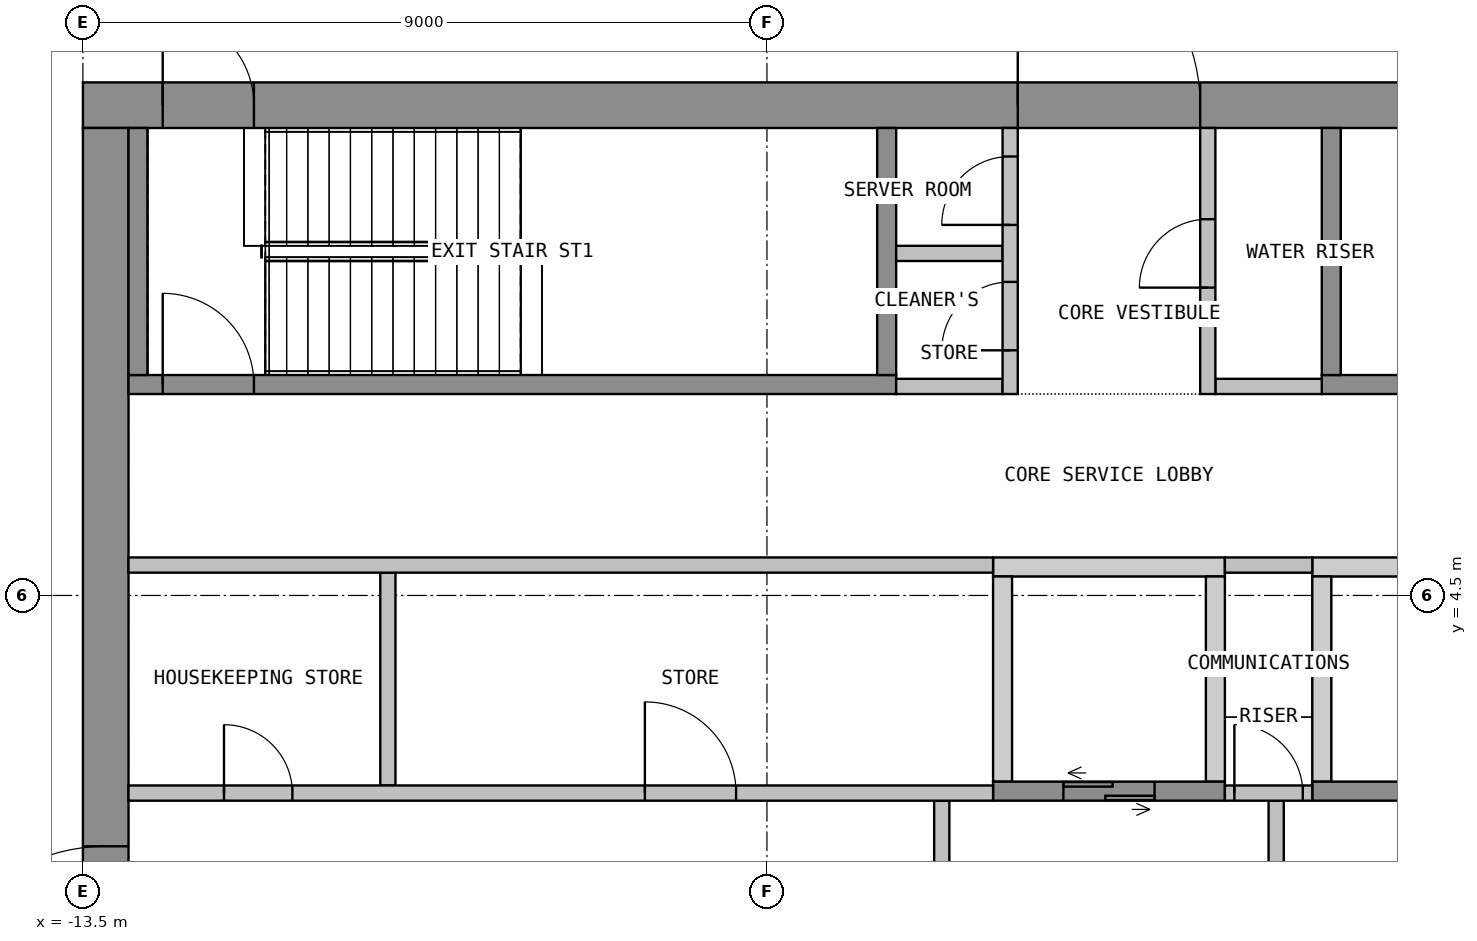
"""IFC4 building model, lengths in metres.
Left out: names, types, materials, properties, quantities, classifications, styles, units other than length and angle.
Written with IfcOpenShell. Run it as: python <this file> out.ifc"""

import sys

from ifc_helpers import new_model, si_unit, direction, frame, frame_2d, origin, place, context, subcontext, project, spatial, polyline, rectangle, outline, extrude, element, fill, save


model = new_model("IFC4")
c1 = context("Model", 3, precision=1e-05, world=origin(), true_north=direction((0.0, 1.0)))
c2 = subcontext(c1, "Body", "Model", "MODEL_VIEW")
j1 = project(units=[si_unit("LENGTHUNIT", "METRE"), si_unit("PLANEANGLEUNIT", "RADIAN")], contexts=[c1])
p1 = place(None, origin())
s1 = spatial("IfcSite", under=j1, at=p1, CompositionType="ELEMENT")
p2 = place(p1, origin())
s2 = spatial("IfcBuilding", under=s1, at=p2, CompositionType="ELEMENT")
p3 = place(p2, frame((0.0, 0.0, 309.9)))
s3 = spatial("IfcBuildingStorey", under=s2, at=p3, CompositionType="ELEMENT", Elevation=309.9)
p4 = place(p3, frame((-13.5, 10.95, 0.0), z_axis=(0.0, 0.0, 1.0), x_axis=(1.0, 0.0, 0.0)))
e1 = element("IfcWall", 1, at=p4, inside=s3, PredefinedType="SHEAR", context=c2, shape_type="SweptSolid", body=[
    extrude(rectangle(XDim=27.0, YDim=0.6, at=frame_2d((13.5, 0.0))), origin(), (0.0, 0.0, 1.0), 8.55),
])
p5 = place(p4, frame((12.3, 0.0, 0.0)))
e2 = element("IfcOpeningElement", 2, at=p5, cuts=e1, PredefinedType="OPENING", context=c2, shape_type="SweptSolid", body=[
    extrude(rectangle(XDim=2.4, YDim=2.1, at=frame_2d((1.2, 1.05))), frame((0.0, 0.31, 0.0), z_axis=(0.0, -1.0, 0.0), x_axis=(1.0, 0.0, 0.0)), (0.0, 0.0, 1.0), 0.62),
])
p6 = place(p4, frame((1.05, 0.0, 0.0)))
e3 = element("IfcOpeningElement", 3, at=p6, cuts=e1, PredefinedType="OPENING", context=c2, shape_type="SweptSolid", body=[
    extrude(rectangle(XDim=1.2, YDim=2.1, at=frame_2d((0.6, 1.05))), frame((0.0, 0.31, 0.0), z_axis=(0.0, -1.0, 0.0), x_axis=(1.0, 0.0, 0.0)), (0.0, 0.0, 1.0), 0.62),
])
p7 = place(p4, frame((24.75, 0.0, 0.0)))
e4 = element("IfcOpeningElement", 4, at=p7, cuts=e1, PredefinedType="OPENING", context=c2, shape_type="SweptSolid", body=[
    extrude(rectangle(XDim=1.2, YDim=2.1, at=frame_2d((0.6, 1.05))), frame((0.0, 0.31, 0.0), z_axis=(0.0, -1.0, 0.0), x_axis=(1.0, 0.0, 0.0)), (0.0, 0.0, 1.0), 0.62),
])
p8 = place(p3, frame((-13.2, -10.65, 0.0), z_axis=(0.0, 0.0, 1.0), x_axis=(0.0, 1.0, 0.0)))
e5 = element("IfcWall", 5, at=p8, inside=s3, PredefinedType="SHEAR", context=c2, shape_type="SweptSolid", body=[
    extrude(rectangle(XDim=21.3, YDim=0.6, at=frame_2d((10.65, 0.0))), origin(), (0.0, 0.0, 1.0), 8.55),
])
p9 = place(p8, frame((9.45, 0.0, 0.0)))
e6 = element("IfcOpeningElement", 6, at=p9, cuts=e5, PredefinedType="OPENING", context=c2, shape_type="SweptSolid", body=[
    extrude(rectangle(XDim=2.4, YDim=2.1, at=frame_2d((1.2, 1.05))), frame((0.0, 0.31, 0.0), z_axis=(0.0, -1.0, 0.0), x_axis=(1.0, 0.0, 0.0)), (0.0, 0.0, 1.0), 0.62),
])
p10 = place(p3, origin())
e7 = element("IfcWall", 7, at=p10, inside=s3, PredefinedType="SHEAR", context=c2, shape_type="SweptSolid", body=[
    extrude(outline(polyline([(-1.525, 4.75), (1.525, 4.75), (1.525, 5.0), (-1.525, 5.0), (-1.525, 4.75)])), origin(), (0.0, 0.0, 1.0), 8.55),
])
p11 = place(p3, origin())
e8 = element("IfcWall", 8, at=p11, inside=s3, PredefinedType="SHEAR", context=c2, shape_type="SweptSolid", body=[
    extrude(outline(polyline([(2.675, 4.75), (8.525, 4.75), (8.525, 5.0), (2.675, 5.0), (2.675, 4.75)])), origin(), (0.0, 0.0, 1.0), 8.55),
])
p12 = place(p3, origin())
e9 = element("IfcWall", 9, at=p12, inside=s3, PredefinedType="SHEAR", context=c2, shape_type="SweptSolid", body=[
    extrude(outline(polyline([(-1.525, 2.05), (-1.275, 2.05), (-1.275, 4.75), (-1.525, 4.75), (-1.525, 2.05)])), origin(), (0.0, 0.0, 1.0), 8.55),
])
p13 = place(p3, origin())
e10 = element("IfcWall", 10, at=p13, inside=s3, PredefinedType="SHEAR", context=c2, shape_type="SweptSolid", body=[
    extrude(outline(polyline([(1.275, 2.05), (1.525, 2.05), (1.525, 4.75), (1.275, 4.75), (1.275, 2.05)])), origin(), (0.0, 0.0, 1.0), 8.55),
])
p14 = place(p3, origin())
e11 = element("IfcWall", 11, at=p14, inside=s3, PredefinedType="SHEAR", context=c2, shape_type="SweptSolid", body=[
    extrude(outline(polyline([(2.675, 2.05), (2.925, 2.05), (2.925, 4.75), (2.675, 4.75), (2.675, 2.05)])), origin(), (0.0, 0.0, 1.0), 8.55),
])
p15 = place(p3, frame((-1.525, 1.925, 0.0), z_axis=(0.0, 0.0, 1.0), x_axis=(1.0, 0.0, 0.0)))
e12 = element("IfcWall", 12, at=p15, inside=s3, PredefinedType="SHEAR", context=c2, shape_type="SweptSolid", body=[
    extrude(rectangle(XDim=3.05, YDim=0.25, at=frame_2d((1.525, 0.0))), origin(), (0.0, 0.0, 1.0), 8.55),
])
p16 = place(p15, frame((0.925, 0.0, 0.0)))
e13 = element("IfcOpeningElement", 13, at=p16, cuts=e12, PredefinedType="OPENING", context=c2, shape_type="SweptSolid", body=[
    extrude(rectangle(XDim=1.2, YDim=2.1, at=frame_2d((0.6, 1.05))), frame((0.0, 0.135, 0.0), z_axis=(0.0, -1.0, 0.0), x_axis=(1.0, 0.0, 0.0)), (0.0, 0.0, 1.0), 0.27),
])
p17 = place(p3, frame((2.675, 1.925, 0.0), z_axis=(0.0, 0.0, 1.0), x_axis=(1.0, 0.0, 0.0)))
e14 = element("IfcWall", 14, at=p17, inside=s3, PredefinedType="SHEAR", context=c2, shape_type="SweptSolid", body=[
    extrude(rectangle(XDim=5.85, YDim=0.25, at=frame_2d((2.925, 0.0))), origin(), (0.0, 0.0, 1.0), 8.55),
])
p18 = place(p3, frame((-2.2, -1.8, 0.0), z_axis=(0.0, 0.0, 1.0), x_axis=(0.0, 1.0, 0.0)))
e15 = element("IfcWall", 15, at=p18, inside=s3, PredefinedType="PARTITIONING", context=c2, shape_type="SweptSolid", body=[
    extrude(rectangle(XDim=3.6, YDim=0.2, at=frame_2d((1.8, 0.0))), origin(), (0.0, 0.0, 1.0), 8.55),
])
p19 = place(p18, frame((1.2, 0.0, 0.0)))
e16 = element("IfcOpeningElement", 16, at=p19, cuts=e15, PredefinedType="OPENING", context=c2, shape_type="SweptSolid", body=[
    extrude(rectangle(XDim=1.2, YDim=2.1, at=frame_2d((0.6, 1.05))), frame((0.0, 0.11, 0.0), z_axis=(0.0, -1.0, 0.0), x_axis=(1.0, 0.0, 0.0)), (0.0, 0.0, 1.0), 0.22),
])
p20 = place(p3, frame((2.2, -1.8, 0.0), z_axis=(0.0, 0.0, 1.0), x_axis=(0.0, 1.0, 0.0)))
e17 = element("IfcWall", 17, at=p20, inside=s3, PredefinedType="PARTITIONING", context=c2, shape_type="SweptSolid", body=[
    extrude(rectangle(XDim=3.6, YDim=0.2, at=frame_2d((1.8, 0.0))), origin(), (0.0, 0.0, 1.0), 8.55),
])
p21 = place(p20, frame((1.2, 0.0, 0.0)))
e18 = element("IfcOpeningElement", 18, at=p21, cuts=e17, PredefinedType="OPENING", context=c2, shape_type="SweptSolid", body=[
    extrude(rectangle(XDim=1.2, YDim=2.1, at=frame_2d((0.6, 1.05))), frame((0.0, 0.11, 0.0), z_axis=(0.0, -1.0, 0.0), x_axis=(1.0, 0.0, 0.0)), (0.0, 0.0, 1.0), 0.22),
])
p22 = place(p3, frame((-12.9, 7.275, 0.0), z_axis=(0.0, 0.0, 1.0), x_axis=(1.0, 0.0, 0.0)))
e19 = element("IfcWall", 19, at=p22, inside=s3, PredefinedType="SHEAR", context=c2, shape_type="SweptSolid", body=[
    extrude(rectangle(XDim=10.1, YDim=0.25, at=frame_2d((5.05, 0.0))), origin(), (0.0, 0.0, 1.0), 8.55),
])
p23 = place(p22, frame((0.45, 0.0, 0.0)))
e20 = element("IfcOpeningElement", 20, at=p23, cuts=e19, PredefinedType="OPENING", context=c2, shape_type="SweptSolid", body=[
    extrude(rectangle(XDim=1.2, YDim=2.1, at=frame_2d((0.6, 1.05))), frame((0.0, 0.135, 0.0), z_axis=(0.0, -1.0, 0.0), x_axis=(1.0, 0.0, 0.0)), (0.0, 0.0, 1.0), 0.27),
])
for number, where, z_axis, x_axis in (
    (21, (-12.775, 7.4, 0.0), (0.0, 0.0, 1.0), (0.0, 1.0, 0.0)),
    (22, (-2.925, 7.4, 0.0), (0.0, 0.0, 1.0), (0.0, 1.0, 0.0)),
):
    element("IfcWall", number, at=place(p3, frame(where, z_axis=z_axis, x_axis=x_axis)), inside=s3, PredefinedType="SHEAR", context=c2, shape_type="SweptSolid", body=[
        extrude(rectangle(XDim=3.25, YDim=0.25, at=frame_2d((1.625, 0.0))), origin(), (0.0, 0.0, 1.0), 8.55),
    ])
p24 = place(p3, frame((2.8, 7.275, 0.0), z_axis=(0.0, 0.0, 1.0), x_axis=(1.0, 0.0, 0.0)))
e23 = element("IfcWall", 23, at=p24, inside=s3, PredefinedType="SHEAR", context=c2, shape_type="SweptSolid", body=[
    extrude(rectangle(XDim=10.1, YDim=0.25, at=frame_2d((5.05, 0.0))), origin(), (0.0, 0.0, 1.0), 8.55),
])
p25 = place(p24, frame((8.45, 0.0, 0.0)))
e24 = element("IfcOpeningElement", 24, at=p25, cuts=e23, PredefinedType="OPENING", context=c2, shape_type="SweptSolid", body=[
    extrude(rectangle(XDim=1.2, YDim=2.1, at=frame_2d((0.6, 1.05))), frame((0.0, 0.135, 0.0), z_axis=(0.0, -1.0, 0.0), x_axis=(1.0, 0.0, 0.0)), (0.0, 0.0, 1.0), 0.27),
])
p26 = place(p3, frame((2.925, 7.4, 0.0), z_axis=(0.0, 0.0, 1.0), x_axis=(0.0, 1.0, 0.0)))
e25 = element("IfcWall", 25, at=p26, inside=s3, PredefinedType="SHEAR", context=c2, shape_type="SweptSolid", body=[
    extrude(rectangle(XDim=3.25, YDim=0.25, at=frame_2d((1.625, 0.0))), origin(), (0.0, 0.0, 1.0), 8.55),
])
for number, where, z_axis, x_axis in (
    (26, (-2.8, 7.25, 0.0), (0.0, 0.0, 1.0), (1.0, 0.0, 0.0)),
    (27, (-2.8, 9.0, 0.0), (0.0, 0.0, 1.0), (1.0, 0.0, 0.0)),
    (28, (1.4, 7.25, 0.0), (0.0, 0.0, 1.0), (1.0, 0.0, 0.0)),
):
    element("IfcWall", number, at=place(p3, frame(where, z_axis=z_axis, x_axis=x_axis)), inside=s3, PredefinedType="PARTITIONING", context=c2, shape_type="SweptSolid", body=[
        extrude(rectangle(XDim=1.4, YDim=0.2, at=frame_2d((0.7, 0.0))), origin(), (0.0, 0.0, 1.0), 8.55),
    ])
p27 = place(p3, frame((-1.3, 7.15, 0.0), z_axis=(0.0, 0.0, 1.0), x_axis=(0.0, 1.0, 0.0)))
e29 = element("IfcWall", 29, at=p27, inside=s3, PredefinedType="PARTITIONING", context=c2, shape_type="SweptSolid", body=[
    extrude(rectangle(XDim=3.5, YDim=0.2, at=frame_2d((1.75, 0.0))), origin(), (0.0, 0.0, 1.0), 8.55),
])
p28 = place(p27, frame((0.575, 0.0, 0.0)))
e30 = element("IfcOpeningElement", 30, at=p28, cuts=e29, PredefinedType="OPENING", context=c2, shape_type="SweptSolid", body=[
    extrude(rectangle(XDim=0.9, YDim=2.1, at=frame_2d((0.45, 1.05))), frame((0.0, 0.11, 0.0), z_axis=(0.0, -1.0, 0.0), x_axis=(1.0, 0.0, 0.0)), (0.0, 0.0, 1.0), 0.22),
])
p29 = place(p27, frame((2.225, 0.0, 0.0)))
e31 = element("IfcOpeningElement", 31, at=p29, cuts=e29, PredefinedType="OPENING", context=c2, shape_type="SweptSolid", body=[
    extrude(rectangle(XDim=0.9, YDim=2.1, at=frame_2d((0.45, 1.05))), frame((0.0, 0.11, 0.0), z_axis=(0.0, -1.0, 0.0), x_axis=(1.0, 0.0, 0.0)), (0.0, 0.0, 1.0), 0.22),
])
p30 = place(p3, frame((1.3, 7.15, 0.0), z_axis=(0.0, 0.0, 1.0), x_axis=(0.0, 1.0, 0.0)))
e32 = element("IfcWall", 32, at=p30, inside=s3, PredefinedType="PARTITIONING", context=c2, shape_type="SweptSolid", body=[
    extrude(rectangle(XDim=3.5, YDim=0.2, at=frame_2d((1.75, 0.0))), origin(), (0.0, 0.0, 1.0), 8.55),
])
p31 = place(p30, frame((1.4, 0.0, 0.0)))
e33 = element("IfcOpeningElement", 33, at=p31, cuts=e32, PredefinedType="OPENING", context=c2, shape_type="SweptSolid", body=[
    extrude(rectangle(XDim=0.9, YDim=2.1, at=frame_2d((0.45, 1.05))), frame((0.0, 0.11, 0.0), z_axis=(0.0, -1.0, 0.0), x_axis=(1.0, 0.0, 0.0)), (0.0, 0.0, 1.0), 0.22),
])
p32 = place(p3, frame((-9.488, 2.0, 0.0), z_axis=(0.0, 0.0, 1.0), x_axis=(0.0, 1.0, 0.0)))
e34 = element("IfcWall", 34, at=p32, inside=s3, PredefinedType="PARTITIONING", context=c2, shape_type="SweptSolid", body=[
    extrude(rectangle(XDim=2.8, YDim=0.2, at=frame_2d((1.4, 0.0))), origin(), (0.0, 0.0, 1.0), 8.55),
])
p33 = place(p3, frame((-12.9, 1.9, 0.0), z_axis=(0.0, 0.0, 1.0), x_axis=(1.0, 0.0, 0.0)))
e35 = element("IfcWall", 35, at=p33, inside=s3, PredefinedType="PARTITIONING", context=c2, shape_type="SweptSolid", body=[
    extrude(rectangle(XDim=11.375, YDim=0.2, at=frame_2d((5.688, 0.0))), origin(), (0.0, 0.0, 1.0), 8.55),
])
p34 = place(p33, frame((1.256, 0.0, 0.0)))
e36 = element("IfcOpeningElement", 36, at=p34, cuts=e35, PredefinedType="OPENING", context=c2, shape_type="SweptSolid", body=[
    extrude(rectangle(XDim=0.9, YDim=2.1, at=frame_2d((0.45, 1.05))), frame((0.0, 0.11, 0.0), z_axis=(0.0, -1.0, 0.0), x_axis=(1.0, 0.0, 0.0)), (0.0, 0.0, 1.0), 0.22),
])
p35 = place(p33, frame((6.794, 0.0, 0.0)))
e37 = element("IfcOpeningElement", 37, at=p35, cuts=e35, PredefinedType="OPENING", context=c2, shape_type="SweptSolid", body=[
    extrude(rectangle(XDim=1.2, YDim=2.1, at=frame_2d((0.6, 1.05))), frame((0.0, 0.11, 0.0), z_axis=(0.0, -1.0, 0.0), x_axis=(1.0, 0.0, 0.0)), (0.0, 0.0, 1.0), 0.22),
])
p36 = place(p3, frame((-12.9, 4.9, 0.0), z_axis=(0.0, 0.0, 1.0), x_axis=(1.0, 0.0, 0.0)))
e38 = element("IfcWall", 38, at=p36, inside=s3, PredefinedType="PARTITIONING", context=c2, shape_type="SweptSolid", body=[
    extrude(rectangle(XDim=11.375, YDim=0.2, at=frame_2d((5.688, 0.0))), origin(), (0.0, 0.0, 1.0), 8.55),
])
p37 = place(p3, frame((1.525, 1.9, 0.0), z_axis=(0.0, 0.0, 1.0), x_axis=(1.0, 0.0, 0.0)))
e39 = element("IfcWall", 39, at=p37, inside=s3, PredefinedType="PARTITIONING", context=c2, shape_type="SweptSolid", body=[
    extrude(rectangle(XDim=1.15, YDim=0.2, at=frame_2d((0.575, 0.0))), origin(), (0.0, 0.0, 1.0), 8.55),
])
p38 = place(p37, frame((0.125, 0.0, 0.0)))
e40 = element("IfcOpeningElement", 40, at=p38, cuts=e39, PredefinedType="OPENING", context=c2, shape_type="SweptSolid", body=[
    extrude(rectangle(XDim=0.9, YDim=2.1, at=frame_2d((0.45, 1.05))), frame((0.0, 0.11, 0.0), z_axis=(0.0, -1.0, 0.0), x_axis=(1.0, 0.0, 0.0)), (0.0, 0.0, 1.0), 0.22),
])
p39 = place(p3, frame((1.525, 4.9, 0.0), z_axis=(0.0, 0.0, 1.0), x_axis=(1.0, 0.0, 0.0)))
e41 = element("IfcWall", 41, at=p39, inside=s3, PredefinedType="PARTITIONING", context=c2, shape_type="SweptSolid", body=[
    extrude(rectangle(XDim=1.15, YDim=0.2, at=frame_2d((0.575, 0.0))), origin(), (0.0, 0.0, 1.0), 8.55),
])
p40 = place(p9, origin())
e42 = element("IfcDoor", 42, at=p40, inside=s3, OperationType="DOUBLE_DOOR_DOUBLE_SWING", PredefinedType="DOOR", context=c2, shape_type="SweptSolid", body=[
    extrude(rectangle(XDim=2.4, YDim=2.1, at=frame_2d((1.2, 1.05))), frame((0.0, 0.025, 0.0), z_axis=(0.0, -1.0, 0.0), x_axis=(1.0, 0.0, 0.0)), (0.0, 0.0, 1.0), 0.05),
])
fill(e6, e42)
p41 = place(p5, origin())
e43 = element("IfcDoor", 43, at=p41, inside=s3, OperationType="DOUBLE_DOOR_DOUBLE_SWING", PredefinedType="DOOR", context=c2, shape_type="SweptSolid", body=[
    extrude(rectangle(XDim=2.4, YDim=2.1, at=frame_2d((1.2, 1.05))), frame((0.0, 0.025, 0.0), z_axis=(0.0, -1.0, 0.0), x_axis=(1.0, 0.0, 0.0)), (0.0, 0.0, 1.0), 0.05),
])
fill(e2, e43)
p42 = place(p6, origin())
e44 = element("IfcDoor", 44, at=p42, inside=s3, OperationType="SINGLE_SWING_RIGHT", PredefinedType="DOOR", context=c2, shape_type="SweptSolid", body=[
    extrude(rectangle(XDim=1.2, YDim=2.1, at=frame_2d((0.6, 1.05))), frame((0.0, 0.025, 0.0), z_axis=(0.0, -1.0, 0.0), x_axis=(1.0, 0.0, 0.0)), (0.0, 0.0, 1.0), 0.05),
])
fill(e3, e44)
p43 = place(p16, origin())
e45 = element("IfcDoor", 45, at=p43, inside=s3, OperationType="DOUBLE_DOOR_SLIDING", PredefinedType="DOOR", context=c2, shape_type="SweptSolid", body=[
    extrude(rectangle(XDim=1.2, YDim=2.1, at=frame_2d((0.6, 1.05))), frame((0.0, 0.025, 0.0), z_axis=(0.0, -1.0, 0.0), x_axis=(1.0, 0.0, 0.0)), (0.0, 0.0, 1.0), 0.05),
])
fill(e13, e45)
p44 = place(p23, origin())
e46 = element("IfcDoor", 46, at=p44, inside=s3, OperationType="SINGLE_SWING_LEFT", PredefinedType="DOOR", context=c2, shape_type="SweptSolid", body=[
    extrude(rectangle(XDim=1.2, YDim=2.1, at=frame_2d((0.6, 1.05))), frame((0.0, 0.025, 0.0), z_axis=(0.0, -1.0, 0.0), x_axis=(1.0, 0.0, 0.0)), (0.0, 0.0, 1.0), 0.05),
])
fill(e20, e46)
p45 = place(p28, origin())
e47 = element("IfcDoor", 47, at=p45, inside=s3, OperationType="SINGLE_SWING_LEFT", PredefinedType="DOOR", context=c2, shape_type="SweptSolid", body=[
    extrude(rectangle(XDim=0.9, YDim=2.1, at=frame_2d((0.45, 1.05))), frame((0.0, 0.025, 0.0), z_axis=(0.0, -1.0, 0.0), x_axis=(1.0, 0.0, 0.0)), (0.0, 0.0, 1.0), 0.05),
])
fill(e30, e47)
p46 = place(p29, origin())
e48 = element("IfcDoor", 48, at=p46, inside=s3, OperationType="SINGLE_SWING_LEFT", PredefinedType="DOOR", context=c2, shape_type="SweptSolid", body=[
    extrude(rectangle(XDim=0.9, YDim=2.1, at=frame_2d((0.45, 1.05))), frame((0.0, 0.025, 0.0), z_axis=(0.0, -1.0, 0.0), x_axis=(1.0, 0.0, 0.0)), (0.0, 0.0, 1.0), 0.05),
])
fill(e31, e48)
p47 = place(p31, origin())
e49 = element("IfcDoor", 49, at=p47, inside=s3, OperationType="SINGLE_SWING_LEFT", PredefinedType="DOOR", context=c2, shape_type="SweptSolid", body=[
    extrude(rectangle(XDim=0.9, YDim=2.1, at=frame_2d((0.45, 1.05))), frame((0.0, 0.025, 0.0), z_axis=(0.0, -1.0, 0.0), x_axis=(1.0, 0.0, 0.0)), (0.0, 0.0, 1.0), 0.05),
])
fill(e33, e49)
p48 = place(p34, origin())
e50 = element("IfcDoor", 50, at=p48, inside=s3, OperationType="SINGLE_SWING_LEFT", PredefinedType="DOOR", context=c2, shape_type="SweptSolid", body=[
    extrude(rectangle(XDim=0.9, YDim=2.1, at=frame_2d((0.45, 1.05))), frame((0.0, 0.025, 0.0), z_axis=(0.0, -1.0, 0.0), x_axis=(1.0, 0.0, 0.0)), (0.0, 0.0, 1.0), 0.05),
])
fill(e36, e50)
p49 = place(p35, origin())
e51 = element("IfcDoor", 51, at=p49, inside=s3, OperationType="SINGLE_SWING_RIGHT", PredefinedType="DOOR", context=c2, shape_type="SweptSolid", body=[
    extrude(rectangle(XDim=1.2, YDim=2.1, at=frame_2d((0.6, 1.05))), frame((0.0, 0.025, 0.0), z_axis=(0.0, -1.0, 0.0), x_axis=(1.0, 0.0, 0.0)), (0.0, 0.0, 1.0), 0.05),
])
fill(e37, e51)
p50 = place(p38, origin())
e52 = element("IfcDoor", 52, at=p50, inside=s3, OperationType="SINGLE_SWING_LEFT", PredefinedType="DOOR", context=c2, shape_type="SweptSolid", body=[
    extrude(rectangle(XDim=0.9, YDim=2.1, at=frame_2d((0.45, 1.05))), frame((0.0, 0.025, 0.0), z_axis=(0.0, -1.0, 0.0), x_axis=(1.0, 0.0, 0.0)), (0.0, 0.0, 1.0), 0.05),
])
fill(e40, e52)
save(model, sys.argv[1])
